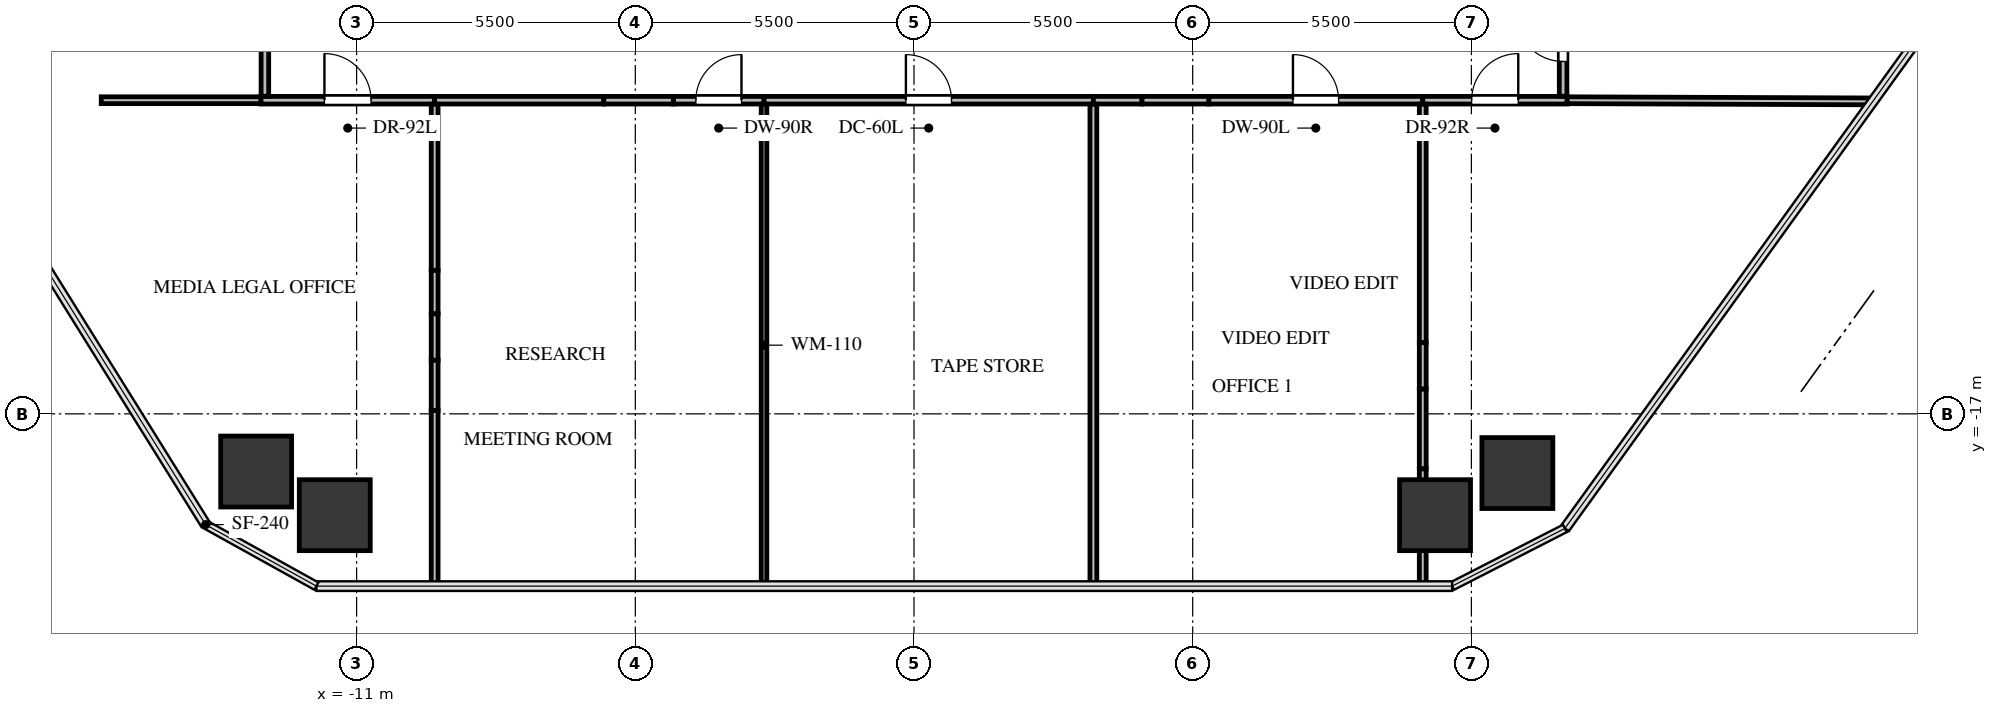
"""IFC4 building model, lengths in metres.
Left out: names, types, materials, properties, quantities, classifications, styles, units other than length and angle.
Written with IfcOpenShell. Run it as: python <this file> out.ifc"""

import sys

from ifc_helpers import new_model, si_unit, direction, frame, frame_2d, origin, origin_2d, place, context, subcontext, project, spatial, rectangle, extrude, source, transform, mapped, element, fill, save


model = new_model("IFC4")
c1 = context("Model", 3, precision=1e-05, world=origin(), true_north=direction((0.0, 1.0)))
c2 = subcontext(c1, "Body", "Model", "MODEL_VIEW")
j1 = project(units=[si_unit("LENGTHUNIT", "METRE"), si_unit("PLANEANGLEUNIT", "RADIAN")], contexts=[c1])
p1 = place(None, origin())
s1 = spatial("IfcSite", under=j1, at=p1, CompositionType="ELEMENT")
p2 = place(p1, origin())
s2 = spatial("IfcBuilding", under=s1, at=p2, CompositionType="ELEMENT")
p3 = place(p2, frame((0.0, 0.0, 45.6)))
s3 = spatial("IfcBuildingStorey", under=s2, at=p3, CompositionType="ELEMENT", Elevation=45.6)
m1 = source(origin(), c2, "Body", "SweptSolid", [
    extrude(rectangle(XDim=1.4, YDim=1.4, at=origin_2d()), origin(), (0.0, 0.0, 1.0), 3.3),
])
for number, where, z_axis, x_axis in (
    (1, (-12.983, -18.138, -0.24), (0.0, 0.0, 1.0), (1.0, 0.0, 0.0)),
    (2, (11.907, -18.168, -0.24), (0.0, 0.0, 1.0), (1.0, 0.0, 0.0)),
    (3, (10.283, -19.0, -0.24), (0.0, 0.0, 1.0), (1.0, 0.0, 0.0)),
    (4, (-11.431, -19.0, -0.24), (0.0, 0.0, 1.0), (1.0, 0.0, 0.0)),
):
    element("IfcColumn", number, at=place(p3, frame(where, z_axis=z_axis, x_axis=x_axis)), inside=s3, PredefinedType="COLUMN", context=c2, shape_type="MappedRepresentation", body=[
        mapped(m1, transform((0.0, 0.0, 0.0), x_axis=(1.0, 0.0, 0.0), y_axis=(0.0, 1.0, 0.0), z_axis=(0.0, 0.0, 1.0), scale=1.0)),
    ])
p4 = place(p3, frame((-12.89, -10.81, 0.0), z_axis=(0.0, 0.0, 1.0), x_axis=(1.0, 0.0, 0.0)))
e5 = element("IfcWall", 5, at=p4, inside=s3, PredefinedType="PARTITIONING", context=c2, shape_type="SweptSolid", body=[
    extrude(rectangle(XDim=3.43, YDim=0.15, at=frame_2d((1.715, 0.0))), origin(), (0.0, 0.0, 1.0), 3.045),
])
p5 = place(p4, frame((1.255, 0.0, 0.0)))
e6 = element("IfcOpeningElement", 6, at=p5, cuts=e5, PredefinedType="OPENING", context=c2, shape_type="SweptSolid", body=[
    extrude(rectangle(XDim=0.92, YDim=2.1, at=frame_2d((0.46, 1.05))), frame((0.0, 0.085, 0.0), z_axis=(0.0, -1.0, 0.0), x_axis=(1.0, 0.0, 0.0)), (0.0, 0.0, 1.0), 0.17),
])
p6 = place(p3, frame((-9.46, -10.81, 0.0), z_axis=(0.0, 0.0, 1.0), x_axis=(1.0, 0.0, 0.0)))
e7 = element("IfcWall", 7, at=p6, inside=s3, PredefinedType="PARTITIONING", context=c2, shape_type="SweptSolid", body=[
    extrude(rectangle(XDim=3.338, YDim=0.15, at=frame_2d((1.669, 0.0))), origin(), (0.0, 0.0, 1.0), 2.13),
])
p7 = place(p3, frame((-4.75, -10.81, 0.0), z_axis=(0.0, 0.0, 1.0), x_axis=(1.0, 0.0, 0.0)))
e8 = element("IfcWall", 8, at=p7, inside=s3, PredefinedType="PARTITIONING", context=c2, shape_type="SweptSolid", body=[
    extrude(rectangle(XDim=1.79, YDim=0.15, at=frame_2d((0.895, 0.0))), origin(), (0.0, 0.0, 1.0), 3.045),
])
p8 = place(p7, frame((0.445, 0.0, 0.0)))
e9 = element("IfcOpeningElement", 9, at=p8, cuts=e8, PredefinedType="OPENING", context=c2, shape_type="SweptSolid", body=[
    extrude(rectangle(XDim=0.9, YDim=2.05, at=frame_2d((0.45, 1.025))), frame((0.0, 0.085, 0.0), z_axis=(0.0, -1.0, 0.0), x_axis=(1.0, 0.0, 0.0)), (0.0, 0.0, 1.0), 0.17),
])
p9 = place(p3, frame((-6.122, -10.81, 0.0), z_axis=(0.0, 0.0, 1.0), x_axis=(1.0, 0.0, 0.0)))
e10 = element("IfcWall", 10, at=p9, inside=s3, PredefinedType="PARTITIONING", context=c2, shape_type="SweptSolid", body=[
    extrude(rectangle(XDim=1.372, YDim=0.15, at=frame_2d((0.686, 0.0))), origin(), (0.0, 0.0, 1.0), 2.13),
])
p10 = place(p3, frame((-2.96, -10.81, 0.0), z_axis=(0.0, 0.0, 1.0), x_axis=(1.0, 0.0, 0.0)))
e11 = element("IfcWall", 11, at=p10, inside=s3, PredefinedType="PARTITIONING", context=c2, shape_type="SweptSolid", body=[
    extrude(rectangle(XDim=6.5, YDim=0.15, at=frame_2d((3.25, 0.0))), origin(), (0.0, 0.0, 1.0), 3.045),
])
p11 = place(p10, frame((2.8, 0.0, 0.0)))
e12 = element("IfcOpeningElement", 12, at=p11, cuts=e11, PredefinedType="OPENING", context=c2, shape_type="SweptSolid", body=[
    extrude(rectangle(XDim=0.9, YDim=2.05, at=frame_2d((0.45, 1.025))), frame((0.0, 0.085, 0.0), z_axis=(0.0, -1.0, 0.0), x_axis=(1.0, 0.0, 0.0)), (0.0, 0.0, 1.0), 0.17),
])
p12 = place(p3, frame((3.54, -10.81, 0.0), z_axis=(0.0, 0.0, 1.0), x_axis=(1.0, 0.0, 0.0)))
e13 = element("IfcWall", 13, at=p12, inside=s3, PredefinedType="PARTITIONING", context=c2, shape_type="SweptSolid", body=[
    extrude(rectangle(XDim=0.959, YDim=0.15, at=frame_2d((0.479, 0.0))), origin(), (0.0, 0.0, 1.0), 3.045),
])
p13 = place(p3, frame((5.817, -10.81, 0.0), z_axis=(0.0, 0.0, 1.0), x_axis=(1.0, 0.0, 0.0)))
e14 = element("IfcWall", 14, at=p13, inside=s3, PredefinedType="PARTITIONING", context=c2, shape_type="SweptSolid", body=[
    extrude(rectangle(XDim=4.223, YDim=0.15, at=frame_2d((2.111, 0.0))), origin(), (0.0, 0.0, 1.0), 2.13),
])
p14 = place(p13, frame((1.661, 0.0, 0.0)))
e15 = element("IfcOpeningElement", 15, at=p14, cuts=e14, PredefinedType="OPENING", context=c2, shape_type="SweptSolid", body=[
    extrude(rectangle(XDim=0.9, YDim=2.05, at=frame_2d((0.45, 1.025))), frame((0.0, 0.085, 0.0), z_axis=(0.0, -1.0, 0.0), x_axis=(1.0, 0.0, 0.0)), (0.0, 0.0, 1.0), 0.17),
])
p15 = place(p3, frame((4.499, -10.81, 0.0), z_axis=(0.0, 0.0, 1.0), x_axis=(1.0, 0.0, 0.0)))
e16 = element("IfcWall", 16, at=p15, inside=s3, PredefinedType="PARTITIONING", context=c2, shape_type="SweptSolid", body=[
    extrude(rectangle(XDim=1.318, YDim=0.15, at=frame_2d((0.659, 0.0))), origin(), (0.0, 0.0, 1.0), 2.13),
])
p16 = place(p3, frame((10.04, -10.81, 0.0), z_axis=(0.0, 0.0, 1.0), x_axis=(1.0, 0.0, 0.0)))
e17 = element("IfcWall", 17, at=p16, inside=s3, PredefinedType="PARTITIONING", context=c2, shape_type="SweptSolid", body=[
    extrude(rectangle(XDim=2.85, YDim=0.15, at=frame_2d((1.425, 0.0))), origin(), (0.0, 0.0, 1.0), 3.045),
])
p17 = place(p16, frame((0.965, 0.0, 0.0)))
e18 = element("IfcOpeningElement", 18, at=p17, cuts=e17, PredefinedType="OPENING", context=c2, shape_type="SweptSolid", body=[
    extrude(rectangle(XDim=0.92, YDim=2.1, at=frame_2d((0.46, 1.05))), frame((0.0, 0.085, 0.0), z_axis=(0.0, -1.0, 0.0), x_axis=(1.0, 0.0, 0.0)), (0.0, 0.0, 1.0), 0.17),
])
p18 = place(p3, frame((-12.81, -4.96, 0.0), z_axis=(0.0, 0.0, 1.0), x_axis=(0.0, -1.0, 0.0)))
e19 = element("IfcWall", 19, at=p18, inside=s3, PredefinedType="PARTITIONING", context=c2, shape_type="SweptSolid", body=[
    extrude(rectangle(XDim=5.771, YDim=0.15, at=frame_2d((2.885, 0.0))), origin(), (0.0, 0.0, 1.0), 3.045),
])
p19 = place(p18, frame((2.41, 0.0, 0.0)))
e20 = element("IfcOpeningElement", 20, at=p19, cuts=e19, PredefinedType="OPENING", context=c2, shape_type="SweptSolid", body=[
    extrude(rectangle(XDim=0.95, YDim=2.1, at=frame_2d((0.475, 1.05))), frame((0.0, 0.085, 0.0), z_axis=(0.0, -1.0, 0.0), x_axis=(1.0, 0.0, 0.0)), (0.0, 0.0, 1.0), 0.17),
])
p20 = place(p3, frame((12.81, -10.731, 0.0), z_axis=(0.0, 0.0, 1.0), x_axis=(0.0, 1.0, 0.0)))
e21 = element("IfcWall", 21, at=p20, inside=s3, PredefinedType="PARTITIONING", context=c2, shape_type="SweptSolid", body=[
    extrude(rectangle(XDim=2.291, YDim=0.15, at=frame_2d((1.146, 0.0))), origin(), (0.0, 0.0, 1.0), 3.045),
])
p21 = place(p20, frame((0.686, 0.0, 0.0)))
e22 = element("IfcOpeningElement", 22, at=p21, cuts=e21, PredefinedType="OPENING", context=c2, shape_type="SweptSolid", body=[
    extrude(rectangle(XDim=0.92, YDim=2.1, at=frame_2d((0.46, 1.05))), frame((0.0, 0.085, 0.0), z_axis=(0.0, -1.0, 0.0), x_axis=(1.0, 0.0, 0.0)), (0.0, 0.0, 1.0), 0.17),
])
p22 = place(p3, frame((-9.46, -10.889, 0.0), z_axis=(0.0, 0.0, 1.0), x_axis=(0.0, -1.0, 0.0)))
e23 = element("IfcWall", 23, at=p22, inside=s3, PredefinedType="PARTITIONING", context=c2, shape_type="SweptSolid", body=[
    extrude(rectangle(XDim=3.278, YDim=0.135, at=frame_2d((1.639, 0.0))), origin(), (0.0, 0.0, 1.0), 2.13),
])
p23 = place(p3, frame((-9.46, -15.024, 0.0), z_axis=(0.0, 0.0, 1.0), x_axis=(0.0, -1.0, 0.0)))
e24 = element("IfcWall", 24, at=p23, inside=s3, PredefinedType="PARTITIONING", context=c2, shape_type="SweptSolid", body=[
    extrude(rectangle(XDim=0.918, YDim=0.135, at=frame_2d((0.459, 0.0))), origin(), (0.0, 0.0, 1.0), 2.13),
])
p24 = place(p3, frame((-9.46, -16.933, 0.0), z_axis=(0.0, 0.0, 1.0), x_axis=(0.0, -1.0, 0.0)))
e25 = element("IfcWall", 25, at=p24, inside=s3, PredefinedType="PARTITIONING", context=c2, shape_type="SweptSolid", body=[
    extrude(rectangle(XDim=3.467, YDim=0.135, at=frame_2d((1.733, 0.0))), origin(), (0.0, 0.0, 1.0), 2.13),
])
p25 = place(p3, frame((-9.46, -14.167, 0.0), z_axis=(0.0, 0.0, 1.0), x_axis=(0.0, -1.0, 0.0)))
e26 = element("IfcWall", 26, at=p25, inside=s3, PredefinedType="PARTITIONING", context=c2, shape_type="SweptSolid", body=[
    extrude(rectangle(XDim=0.857, YDim=0.135, at=frame_2d((0.428, 0.0))), origin(), (0.0, 0.0, 1.0), 2.13),
])
p26 = place(p3, frame((-9.46, -15.942, 0.0), z_axis=(0.0, 0.0, 1.0), x_axis=(0.0, -1.0, 0.0)))
e27 = element("IfcWall", 27, at=p26, inside=s3, PredefinedType="PARTITIONING", context=c2, shape_type="SweptSolid", body=[
    extrude(rectangle(XDim=0.99, YDim=0.135, at=frame_2d((0.495, 0.0))), origin(), (0.0, 0.0, 1.0), 2.13),
])
p27 = place(p3, frame((-16.04, -10.81, 0.0), z_axis=(0.0, 0.0, 1.0), x_axis=(1.0, 0.0, 0.0)))
e28 = element("IfcWall", 28, at=p27, inside=s3, PredefinedType="PARTITIONING", context=c2, shape_type="SweptSolid", body=[
    extrude(rectangle(XDim=3.15, YDim=0.135, at=frame_2d((1.575, 0.0))), origin(), (0.0, 0.0, 1.0), 3.045),
])
p28 = place(p3, frame((-2.96, -10.889, 0.0), z_axis=(0.0, 0.0, 1.0), x_axis=(0.0, -1.0, 0.0)))
e29 = element("IfcWall", 29, at=p28, inside=s3, PredefinedType="MOVABLE", context=c2, shape_type="SweptSolid", body=[
    extrude(rectangle(XDim=9.511, YDim=0.11, at=frame_2d((4.755, 0.0))), origin(), (0.0, 0.0, 1.0), 2.38),
])
p29 = place(p3, frame((3.54, -10.889, 0.0), z_axis=(0.0, 0.0, 1.0), x_axis=(0.0, -1.0, 0.0)))
e30 = element("IfcWall", 30, at=p29, inside=s3, PredefinedType="PARTITIONING", context=c2, shape_type="SweptSolid", body=[
    extrude(rectangle(XDim=9.511, YDim=0.135, at=frame_2d((4.755, 0.0))), origin(), (0.0, 0.0, 1.0), 2.38),
])
p30 = place(p3, frame((10.04, -10.889, 0.0), z_axis=(0.0, 0.0, 1.0), x_axis=(0.0, -1.0, 0.0)))
e31 = element("IfcWall", 31, at=p30, inside=s3, PredefinedType="PARTITIONING", context=c2, shape_type="SweptSolid", body=[
    extrude(rectangle(XDim=4.707, YDim=0.135, at=frame_2d((2.354, 0.0))), origin(), (0.0, 0.0, 1.0), 2.13),
])
p31 = place(p3, frame((10.04, -16.509, 0.0), z_axis=(0.0, 0.0, 1.0), x_axis=(0.0, -1.0, 0.0)))
e32 = element("IfcWall", 32, at=p31, inside=s3, PredefinedType="PARTITIONING", context=c2, shape_type="SweptSolid", body=[
    extrude(rectangle(XDim=1.578, YDim=0.135, at=frame_2d((0.789, 0.0))), origin(), (0.0, 0.0, 1.0), 2.13),
])
p32 = place(p3, frame((10.04, -15.596, 0.0), z_axis=(0.0, 0.0, 1.0), x_axis=(0.0, -1.0, 0.0)))
e33 = element("IfcWall", 33, at=p32, inside=s3, PredefinedType="PARTITIONING", context=c2, shape_type="SweptSolid", body=[
    extrude(rectangle(XDim=0.913, YDim=0.135, at=frame_2d((0.457, 0.0))), origin(), (0.0, 0.0, 1.0), 2.13),
])
p33 = place(p3, frame((10.04, -18.086, 0.0), z_axis=(0.0, 0.0, 1.0), x_axis=(0.0, -1.0, 0.0)))
e34 = element("IfcWall", 34, at=p33, inside=s3, PredefinedType="PARTITIONING", context=c2, shape_type="SweptSolid", body=[
    extrude(rectangle(XDim=2.314, YDim=0.135, at=frame_2d((1.157, 0.0))), origin(), (0.0, 0.0, 1.0), 1.877),
])
p34 = place(p3, frame((12.89, -10.81, 0.0), z_axis=(0.0, 0.0, 1.0), x_axis=(0.999992607823, -0.003845035728, 0.0)))
e35 = element("IfcWall", 35, at=p34, inside=s3, PredefinedType="PARTITIONING", context=c2, shape_type="SweptSolid", body=[
    extrude(rectangle(XDim=6.032, YDim=0.135, at=frame_2d((3.016, 0.0))), origin(), (0.0, 0.0, 1.0), 2.38),
])
m2 = source(origin(), c2, "Body", "SweptSolid", [
    extrude(rectangle(XDim=0.92, YDim=2.1, at=frame_2d((0.46, 1.05))), frame((0.0, 0.025, 0.0), z_axis=(0.0, -1.0, 0.0), x_axis=(1.0, 0.0, 0.0)), (0.0, 0.0, 1.0), 0.05),
])
p35 = place(p5, origin())
e36 = element("IfcDoor", 36, at=p35, inside=s3, OperationType="SINGLE_SWING_LEFT", PredefinedType="DOOR", context=c2, shape_type="MappedRepresentation", body=[
    mapped(m2, transform((0.0, 0.0, 0.0), x_axis=(1.0, 0.0, 0.0), y_axis=(0.0, 1.0, 0.0), z_axis=(0.0, 0.0, 1.0), scale=1.0)),
])
fill(e6, e36)
m3 = source(origin(), c2, "Body", "SweptSolid", [
    extrude(rectangle(XDim=0.9, YDim=2.05, at=frame_2d((0.45, 1.025))), frame((0.0, 0.025, 0.0), z_axis=(0.0, -1.0, 0.0), x_axis=(1.0, 0.0, 0.0)), (0.0, 0.0, 1.0), 0.05),
])
p36 = place(p8, origin())
e37 = element("IfcDoor", 37, at=p36, inside=s3, OperationType="SINGLE_SWING_RIGHT", PredefinedType="DOOR", context=c2, shape_type="MappedRepresentation", body=[
    mapped(m3, transform((0.0, 0.0, 0.0), x_axis=(1.0, 0.0, 0.0), y_axis=(0.0, 1.0, 0.0), z_axis=(0.0, 0.0, 1.0), scale=1.0)),
])
fill(e9, e37)
m4 = source(origin(), c2, "Body", "SweptSolid", [
    extrude(rectangle(XDim=0.9, YDim=2.05, at=frame_2d((0.45, 1.025))), frame((0.0, 0.025, 0.0), z_axis=(0.0, -1.0, 0.0), x_axis=(1.0, 0.0, 0.0)), (0.0, 0.0, 1.0), 0.05),
])
p37 = place(p11, origin())
e38 = element("IfcDoor", 38, at=p37, inside=s3, OperationType="SINGLE_SWING_LEFT", PredefinedType="DOOR", context=c2, shape_type="MappedRepresentation", body=[
    mapped(m4, transform((0.0, 0.0, 0.0), x_axis=(1.0, 0.0, 0.0), y_axis=(0.0, 1.0, 0.0), z_axis=(0.0, 0.0, 1.0), scale=1.0)),
])
fill(e12, e38)
m5 = source(origin(), c2, "Body", "SweptSolid", [
    extrude(rectangle(XDim=0.9, YDim=2.05, at=frame_2d((0.45, 1.025))), frame((0.0, 0.025, 0.0), z_axis=(0.0, -1.0, 0.0), x_axis=(1.0, 0.0, 0.0)), (0.0, 0.0, 1.0), 0.05),
])
p38 = place(p14, origin())
e39 = element("IfcDoor", 39, at=p38, inside=s3, OperationType="SINGLE_SWING_LEFT", PredefinedType="DOOR", context=c2, shape_type="MappedRepresentation", body=[
    mapped(m5, transform((0.0, 0.0, 0.0), x_axis=(1.0, 0.0, 0.0), y_axis=(0.0, 1.0, 0.0), z_axis=(0.0, 0.0, 1.0), scale=1.0)),
])
fill(e15, e39)
m6 = source(origin(), c2, "Body", "SweptSolid", [
    extrude(rectangle(XDim=0.92, YDim=2.1, at=frame_2d((0.46, 1.05))), frame((0.0, 0.025, 0.0), z_axis=(0.0, -1.0, 0.0), x_axis=(1.0, 0.0, 0.0)), (0.0, 0.0, 1.0), 0.05),
])
p39 = place(p17, origin())
e40 = element("IfcDoor", 40, at=p39, inside=s3, OperationType="SINGLE_SWING_RIGHT", PredefinedType="DOOR", context=c2, shape_type="MappedRepresentation", body=[
    mapped(m6, transform((0.0, 0.0, 0.0), x_axis=(1.0, 0.0, 0.0), y_axis=(0.0, 1.0, 0.0), z_axis=(0.0, 0.0, 1.0), scale=1.0)),
])
fill(e18, e40)
p40 = place(p21, origin())
e41 = element("IfcDoor", 41, at=p40, inside=s3, OperationType="SINGLE_SWING_RIGHT", PredefinedType="DOOR", context=c2, shape_type="MappedRepresentation", body=[
    mapped(m6, transform((0.0, 0.0, 0.0), x_axis=(1.0, 0.0, 0.0), y_axis=(0.0, 1.0, 0.0), z_axis=(0.0, 0.0, 1.0), scale=1.0)),
])
fill(e22, e41)
save(model, sys.argv[1])
